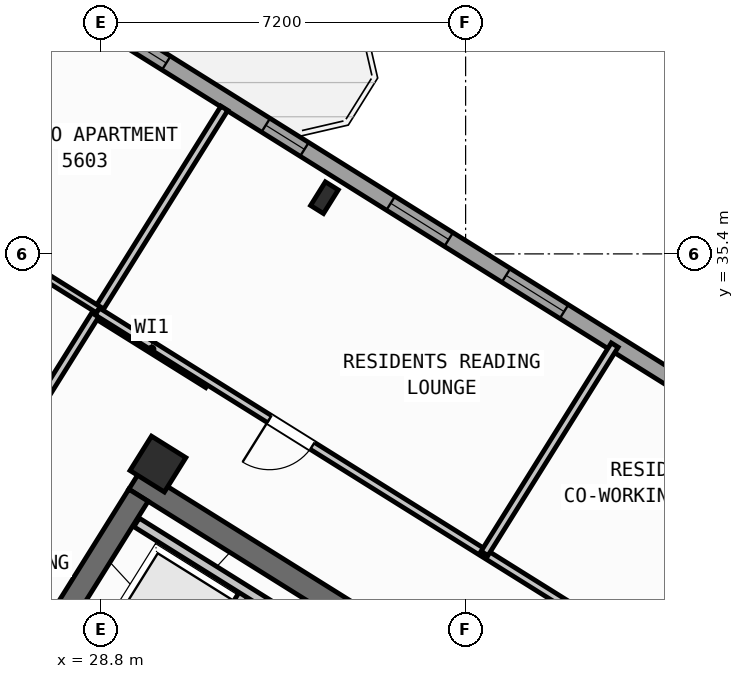
"""IFC4 building model, lengths in metres.
Left out: names, types, materials, properties, quantities, classifications, styles, units other than length and angle.
Written with IfcOpenShell. Run it as: python <this file> out.ifc"""

import sys

from ifc_helpers import new_model, si_unit, direction, frame, frame_2d, origin, origin_2d, place, context, subcontext, project, spatial, rectangle, hollow_rectangle, i_section, extrude, source, transform, mapped, element, fill, save


model = new_model("IFC4")
c1 = context("Model", 3, precision=1e-05, world=origin(), true_north=direction((0.0, 1.0)))
c2 = subcontext(c1, "Body", "Model", "MODEL_VIEW")
j1 = project(units=[si_unit("LENGTHUNIT", "METRE"), si_unit("PLANEANGLEUNIT", "RADIAN")], contexts=[c1])
p1 = place(None, origin())
s1 = spatial("IfcSite", under=j1, at=p1, CompositionType="ELEMENT")
p2 = place(p1, origin())
s2 = spatial("IfcBuilding", under=s1, at=p2, CompositionType="ELEMENT")
p3 = place(p2, frame((0.0, 0.0, 222.0)))
s3 = spatial("IfcBuildingStorey", under=s2, at=p3, CompositionType="ELEMENT", Elevation=222.0)
p4 = place(p3, frame((40.531, 24.036, 0.0), z_axis=(0.0, 0.0, 1.0), x_axis=(-0.848048787466, 0.529918157905, 0.0)))
e1 = element("IfcWall", 1, at=p4, inside=s3, PredefinedType="SHEAR", context=c2, shape_type="SweptSolid", body=[
    extrude(rectangle(XDim=13.04, YDim=0.45, at=frame_2d((6.52, 0.0))), origin(), (0.0, 0.0, 1.0), 3.35),
])
p5 = place(p3, frame((29.544, 30.636, 0.0), z_axis=(0.0, 0.0, 1.0), x_axis=(-0.529902075036, -0.848058836916, 0.0)))
e2 = element("IfcWall", 2, at=p5, inside=s3, PredefinedType="SHEAR", context=c2, shape_type="SweptSolid", body=[
    extrude(rectangle(XDim=3.625, YDim=0.45, at=frame_2d((1.812, 0.0))), origin(), (0.0, 0.0, 1.0), 3.35),
])
m1 = source(origin(), c2, "Body", "SweptSolid", [
    extrude(i_section(OverallWidth=0.3, OverallDepth=0.55, WebThickness=0.015, FlangeThickness=0.029, at=origin_2d()), origin(), (0.0, 0.0, 1.0), 3.6),
])
p6 = place(p3, frame((33.213, 36.509, 0.0), z_axis=(0.0, 0.0, 1.0), x_axis=(-0.848048096156, 0.529919264233, 0.0)))
e3 = element("IfcColumn", 3, at=p6, inside=s3, PredefinedType="COLUMN", context=c2, shape_type="MappedRepresentation", body=[
    mapped(m1, transform((0.0, 0.0, 0.0), scale=1.0)),
])
m2 = source(origin(), c2, "Body", "SweptSolid", [
    extrude(hollow_rectangle(XDim=0.8, YDim=0.8, WallThickness=0.032, at=origin_2d()), origin(), (0.0, 0.0, 1.0), 3.6),
])
p7 = place(p3, frame((29.928, 31.251, 0.0), z_axis=(0.0, 0.0, 1.0), x_axis=(-0.848048096156, 0.529919264233, 0.0)))
e4 = element("IfcColumn", 4, at=p7, inside=s3, PredefinedType="COLUMN", context=c2, shape_type="MappedRepresentation", body=[
    mapped(m2, transform((0.0, 0.0, 0.0), scale=1.0)),
])
p8 = place(p3, frame((17.424, 47.083, 0.0), z_axis=(0.0, 0.0, 1.0), x_axis=(0.848049927979, -0.529916332693, 0.0)))
e5 = element("IfcWall", 5, at=p8, inside=s3, PredefinedType="STANDARD", context=c2, shape_type="SweptSolid", body=[
    extrude(rectangle(XDim=29.223, YDim=0.32, at=frame_2d((14.612, 0.0))), origin(), (0.0, 0.0, 1.0), 3.35),
])
p9 = place(p8, frame((3.77, 0.0, 0.0)))
e6 = element("IfcOpeningElement", 6, at=p9, cuts=e5, PredefinedType="OPENING", context=c2, shape_type="SweptSolid", body=[
    extrude(rectangle(XDim=1.05, YDim=2.15, at=frame_2d((0.525, 1.075))), frame((0.0, 0.17, 0.0), z_axis=(0.0, -1.0, 0.0), x_axis=(1.0, 0.0, 0.0)), (0.0, 0.0, 1.0), 0.34),
])
p10 = place(p8, frame((1.125, 0.0, 0.9)))
e7 = element("IfcOpeningElement", 7, at=p10, cuts=e5, PredefinedType="OPENING", context=c2, shape_type="SweptSolid", body=[
    extrude(rectangle(XDim=1.65, YDim=1.45, at=frame_2d((0.825, 0.725))), frame((0.0, 0.17, 0.0), z_axis=(0.0, -1.0, 0.0), x_axis=(1.0, 0.0, 0.0)), (0.0, 0.0, 1.0), 0.34),
])
p11 = place(p8, frame((7.384, 0.0, 0.9)))
e8 = element("IfcOpeningElement", 8, at=p11, cuts=e5, PredefinedType="OPENING", context=c2, shape_type="SweptSolid", body=[
    extrude(rectangle(XDim=1.35, YDim=1.45, at=frame_2d((0.675, 0.725))), frame((0.0, 0.17, 0.0), z_axis=(0.0, -1.0, 0.0), x_axis=(1.0, 0.0, 0.0)), (0.0, 0.0, 1.0), 0.34),
])
p12 = place(p8, frame((10.054, 0.0, 0.9)))
e9 = element("IfcOpeningElement", 9, at=p12, cuts=e5, PredefinedType="OPENING", context=c2, shape_type="SweptSolid", body=[
    extrude(rectangle(XDim=1.35, YDim=1.45, at=frame_2d((0.675, 0.725))), frame((0.0, 0.17, 0.0), z_axis=(0.0, -1.0, 0.0), x_axis=(1.0, 0.0, 0.0)), (0.0, 0.0, 1.0), 0.34),
])
p13 = place(p8, frame((14.039, 0.0, 1.0)))
e10 = element("IfcOpeningElement", 10, at=p13, cuts=e5, PredefinedType="OPENING", context=c2, shape_type="SweptSolid", body=[
    extrude(rectangle(XDim=0.9, YDim=1.25, at=frame_2d((0.45, 0.625))), frame((0.0, 0.17, 0.0), z_axis=(0.0, -1.0, 0.0), x_axis=(1.0, 0.0, 0.0)), (0.0, 0.0, 1.0), 0.34),
])
p14 = place(p8, frame((17.254, 0.0, 1.0)))
e11 = element("IfcOpeningElement", 11, at=p14, cuts=e5, PredefinedType="OPENING", context=c2, shape_type="SweptSolid", body=[
    extrude(rectangle(XDim=0.9, YDim=1.25, at=frame_2d((0.45, 0.625))), frame((0.0, 0.17, 0.0), z_axis=(0.0, -1.0, 0.0), x_axis=(1.0, 0.0, 0.0)), (0.0, 0.0, 1.0), 0.34),
])
p15 = place(p8, frame((20.161, 0.0, 0.9)))
e12 = element("IfcOpeningElement", 12, at=p15, cuts=e5, PredefinedType="OPENING", context=c2, shape_type="SweptSolid", body=[
    extrude(rectangle(XDim=1.35, YDim=1.45, at=frame_2d((0.675, 0.725))), frame((0.0, 0.17, 0.0), z_axis=(0.0, -1.0, 0.0), x_axis=(1.0, 0.0, 0.0)), (0.0, 0.0, 1.0), 0.34),
])
p16 = place(p8, frame((22.846, 0.0, 0.9)))
e13 = element("IfcOpeningElement", 13, at=p16, cuts=e5, PredefinedType="OPENING", context=c2, shape_type="SweptSolid", body=[
    extrude(rectangle(XDim=1.35, YDim=1.45, at=frame_2d((0.675, 0.725))), frame((0.0, 0.17, 0.0), z_axis=(0.0, -1.0, 0.0), x_axis=(1.0, 0.0, 0.0)), (0.0, 0.0, 1.0), 0.34),
])
p17 = place(p8, frame((26.898, 0.0, 1.0)))
e14 = element("IfcOpeningElement", 14, at=p17, cuts=e5, PredefinedType="OPENING", context=c2, shape_type="SweptSolid", body=[
    extrude(rectangle(XDim=0.9, YDim=1.25, at=frame_2d((0.45, 0.625))), frame((0.0, 0.17, 0.0), z_axis=(0.0, -1.0, 0.0), x_axis=(1.0, 0.0, 0.0)), (0.0, 0.0, 1.0), 0.34),
])
p18 = place(p3, frame((31.645, 28.716, 0.0), z_axis=(0.0, 0.0, 1.0), x_axis=(-0.52986693015, -0.848080795876, 0.0)))
e15 = element("IfcWall", 15, at=p18, inside=s3, PredefinedType="STANDARD", context=c2, shape_type="SweptSolid", body=[
    extrude(rectangle(XDim=2.66, YDim=0.2, at=frame_2d((1.33, 0.0))), origin(), (0.0, 0.0, 1.0), 3.34),
])
p19 = place(p3, frame((33.363, 27.69, 0.0), z_axis=(0.0, 0.0, 1.0), x_axis=(-0.84804957148, 0.529916903215, 0.0)))
e16 = element("IfcWall", 16, at=p19, inside=s3, PredefinedType="STANDARD", context=c2, shape_type="SweptSolid", body=[
    extrude(rectangle(XDim=4.548, YDim=0.2, at=frame_2d((2.274, 0.0))), origin(), (0.0, 0.0, 1.0), 3.34),
])
p20 = place(p3, frame((30.914, 32.829, 0.0), z_axis=(0.0, 0.0, 1.0), x_axis=(-0.848008813643, 0.529982124211, 0.0)))
e17 = element("IfcWall", 17, at=p20, inside=s3, PredefinedType="PARTITIONING", context=c2, shape_type="SweptSolid", body=[
    extrude(rectangle(XDim=2.61, YDim=0.16, at=frame_2d((1.305, 0.0))), origin(), (0.0, 0.0, 1.0), 3.34),
])
p21 = place(p3, frame((31.239, 38.274, 0.0), z_axis=(0.0, 0.0, 1.0), x_axis=(-0.529920220799, -0.848047498427, 0.0)))
e18 = element("IfcWall", 18, at=p21, inside=s3, PredefinedType="PARTITIONING", context=c2, shape_type="SweptSolid", body=[
    extrude(rectangle(XDim=9.2, YDim=0.16, at=frame_2d((4.6, 0.0))), origin(), (0.0, 0.0, 1.0), 3.34),
])
p22 = place(p3, frame((28.753, 34.297, 0.0), z_axis=(0.0, 0.0, 1.0), x_axis=(-0.848059820872, 0.529900500304, 0.0)))
e19 = element("IfcWall", 19, at=p22, inside=s3, PredefinedType="PLUMBINGWALL", context=c2, shape_type="SweptSolid", body=[
    extrude(rectangle(XDim=3.79, YDim=0.14, at=frame_2d((1.895, 0.0))), origin(), (0.0, 0.0, 1.0), 3.34),
])
p23 = place(p22, frame((2.23, 0.0, 0.0)))
e20 = element("IfcOpeningElement", 20, at=p23, cuts=e19, PredefinedType="OPENING", context=c2, shape_type="SweptSolid", body=[
    extrude(rectangle(XDim=0.92, YDim=2.08, at=frame_2d((0.46, 1.04))), frame((0.0, 0.08, 0.0), z_axis=(0.0, -1.0, 0.0), x_axis=(1.0, 0.0, 0.0)), (0.0, 0.0, 1.0), 0.16),
])
p24 = place(p3, frame((41.936, 26.012, 0.0), z_axis=(0.0, 0.0, 1.0), x_axis=(-0.848051154596, 0.529914369676, 0.0)))
e21 = element("IfcWall", 21, at=p24, inside=s3, PredefinedType="PARTITIONING", context=c2, shape_type="SweptSolid", body=[
    extrude(rectangle(XDim=15.57, YDim=0.16, at=frame_2d((7.785, 0.0))), origin(), (0.0, 0.0, 1.0), 3.34),
])
p25 = place(p24, frame((3.415, 0.0, 0.0)))
e22 = element("IfcOpeningElement", 22, at=p25, cuts=e21, PredefinedType="OPENING", context=c2, shape_type="SweptSolid", body=[
    extrude(rectangle(XDim=1.0, YDim=2.1, at=frame_2d((0.5, 1.05))), frame((0.0, 0.09, 0.0), z_axis=(0.0, -1.0, 0.0), x_axis=(1.0, 0.0, 0.0)), (0.0, 0.0, 1.0), 0.18),
])
p26 = place(p24, frame((10.565, 0.0, 0.0)))
e23 = element("IfcOpeningElement", 23, at=p26, cuts=e21, PredefinedType="OPENING", context=c2, shape_type="SweptSolid", body=[
    extrude(rectangle(XDim=1.0, YDim=2.1, at=frame_2d((0.5, 1.05))), frame((0.0, 0.09, 0.0), z_axis=(0.0, -1.0, 0.0), x_axis=(1.0, 0.0, 0.0)), (0.0, 0.0, 1.0), 0.18),
])
p27 = place(p3, frame((38.943, 33.601, 0.0), z_axis=(0.0, 0.0, 1.0), x_axis=(-0.529949167559, -0.848029409752, 0.0)))
e24 = element("IfcWall", 24, at=p27, inside=s3, PredefinedType="PARTITIONING", context=c2, shape_type="SweptSolid", body=[
    extrude(rectangle(XDim=4.85, YDim=0.16, at=frame_2d((2.425, 0.0))), origin(), (0.0, 0.0, 1.0), 3.34),
])
m3 = source(origin(), c2, "Body", "SweptSolid", [
    extrude(rectangle(XDim=0.9, YDim=1.25, at=frame_2d((0.45, 0.625))), frame((0.0, 0.03, 0.0), z_axis=(0.0, -1.0, 0.0), x_axis=(1.0, 0.0, 0.0)), (0.0, 0.0, 1.0), 0.06),
])
p28 = place(p13, origin())
e25 = element("IfcWindow", 25, at=p28, inside=s3, PartitioningType="SINGLE_PANEL", PredefinedType="WINDOW", context=c2, shape_type="MappedRepresentation", body=[
    mapped(m3, transform((0.0, 0.0, 0.0), scale=1.0)),
])
fill(e10, e25)
p29 = place(p14, origin())
e26 = element("IfcWindow", 26, at=p29, inside=s3, PartitioningType="SINGLE_PANEL", PredefinedType="WINDOW", context=c2, shape_type="MappedRepresentation", body=[
    mapped(m3, transform((0.0, 0.0, 0.0), scale=1.0)),
])
fill(e11, e26)
m4 = source(origin(), c2, "Body", "SweptSolid", [
    extrude(rectangle(XDim=1.35, YDim=1.45, at=frame_2d((0.675, 0.725))), frame((0.0, 0.03, 0.0), z_axis=(0.0, -1.0, 0.0), x_axis=(1.0, 0.0, 0.0)), (0.0, 0.0, 1.0), 0.06),
])
p30 = place(p15, origin())
e27 = element("IfcWindow", 27, at=p30, inside=s3, PartitioningType="SINGLE_PANEL", PredefinedType="WINDOW", context=c2, shape_type="MappedRepresentation", body=[
    mapped(m4, transform((0.0, 0.0, 0.0), scale=1.0)),
])
fill(e12, e27)
p31 = place(p16, origin())
e28 = element("IfcWindow", 28, at=p31, inside=s3, PartitioningType="SINGLE_PANEL", PredefinedType="WINDOW", context=c2, shape_type="MappedRepresentation", body=[
    mapped(m4, transform((0.0, 0.0, 0.0), scale=1.0)),
])
fill(e13, e28)
m5 = source(origin(), c2, "Body", "SweptSolid", [
    extrude(rectangle(XDim=1.0, YDim=2.1, at=frame_2d((0.5, 1.05))), frame((0.0, 0.025, 0.0), z_axis=(0.0, -1.0, 0.0), x_axis=(1.0, 0.0, 0.0)), (0.0, 0.0, 1.0), 0.05),
])
p32 = place(p26, origin())
e29 = element("IfcDoor", 29, at=p32, inside=s3, OperationType="SINGLE_SWING_RIGHT", PredefinedType="DOOR", context=c2, shape_type="MappedRepresentation", body=[
    mapped(m5, transform((0.0, 0.0, 0.0), scale=1.0)),
])
fill(e23, e29)
save(model, sys.argv[1])
